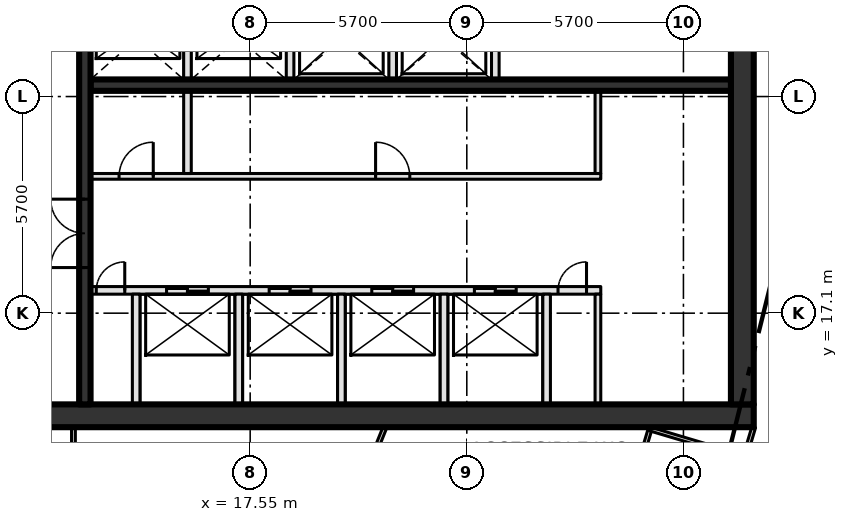
"""IFC4 building model, lengths in metres.
Left out: names, types, materials, properties, quantities, classifications, styles, units other than length and angle.
Written with IfcOpenShell. Run it as: python <this file> out.ifc"""

import sys

from ifc_helpers import new_model, si_unit, direction, frame, frame_2d, origin, place, context, subcontext, project, spatial, rectangle, extrude, element, fill, save


model = new_model("IFC4")
c1 = context("Model", 3, precision=1e-05, world=origin(), true_north=direction((0.0, 1.0)))
c2 = subcontext(c1, "Body", "Model", "MODEL_VIEW")
j1 = project(units=[si_unit("LENGTHUNIT", "METRE"), si_unit("PLANEANGLEUNIT", "RADIAN")], contexts=[c1])
p1 = place(None, origin())
s1 = spatial("IfcSite", under=j1, at=p1, CompositionType="ELEMENT")
p2 = place(p1, origin())
s2 = spatial("IfcBuilding", under=s1, at=p2, CompositionType="ELEMENT")
p3 = place(p2, frame((0.0, 0.0, 302.4)))
s3 = spatial("IfcBuildingStorey", under=s2, at=p3, CompositionType="ELEMENT", Elevation=302.4)
p4 = place(p3, frame((8.0, 14.4, -0.3), z_axis=(0.0, 0.0, 1.0), x_axis=(1.0, 0.0, 0.0)))
e1 = element("IfcWall", 1, at=p4, inside=s3, PredefinedType="SHEAR", context=c2, shape_type="SweptSolid", body=[
    extrude(rectangle(XDim=22.8, YDim=0.6, at=frame_2d((11.4, 0.0))), origin(), (0.0, 0.0, 1.0), 4.2),
])
p5 = place(p4, frame((2.3, 0.0, 0.3)))
e2 = element("IfcOpeningElement", 2, at=p5, cuts=e1, PredefinedType="OPENING", context=c2, shape_type="SweptSolid", body=[
    extrude(rectangle(XDim=1.8, YDim=2.1, at=frame_2d((0.9, 1.05))), frame((0.0, 0.31, 0.0), z_axis=(0.0, -1.0, 0.0), x_axis=(1.0, 0.0, 0.0)), (0.0, 0.0, 1.0), 0.62),
])
p6 = place(p3, frame((30.5, 14.7, -0.3), z_axis=(0.0, 0.0, 1.0), x_axis=(0.0, 1.0, 0.0)))
e3 = element("IfcWall", 3, at=p6, inside=s3, PredefinedType="SHEAR", context=c2, shape_type="SweptSolid", body=[
    extrude(rectangle(XDim=21.0, YDim=0.6, at=frame_2d((10.5, 0.0))), origin(), (0.0, 0.0, 1.0), 4.2),
])
p7 = place(p3, frame((13.35, 17.7, 0.0), z_axis=(0.0, 0.0, 1.0), x_axis=(1.0, 0.0, 0.0)))
e4 = element("IfcWall", 4, at=p7, inside=s3, PredefinedType="SOLIDWALL", context=c2, shape_type="SweptSolid", body=[
    extrude(rectangle(XDim=13.425, YDim=0.2, at=frame_2d((6.712, 0.0))), origin(), (0.0, 0.0, 1.0), 3.9),
])
p8 = place(p7, frame((2.0, 0.0, 0.0)))
e5 = element("IfcOpeningElement", 5, at=p8, cuts=e4, PredefinedType="OPENING", context=c2, shape_type="SweptSolid", body=[
    extrude(rectangle(XDim=1.1, YDim=2.1, at=frame_2d((0.55, 1.05))), frame((0.0, 0.11, 0.0), z_axis=(0.0, -1.0, 0.0), x_axis=(1.0, 0.0, 0.0)), (0.0, 0.0, 1.0), 0.22),
])
p9 = place(p7, frame((4.7, 0.0, 0.0)))
e6 = element("IfcOpeningElement", 6, at=p9, cuts=e4, PredefinedType="OPENING", context=c2, shape_type="SweptSolid", body=[
    extrude(rectangle(XDim=1.1, YDim=2.1, at=frame_2d((0.55, 1.05))), frame((0.0, 0.11, 0.0), z_axis=(0.0, -1.0, 0.0), x_axis=(1.0, 0.0, 0.0)), (0.0, 0.0, 1.0), 0.22),
])
p10 = place(p7, frame((7.4, 0.0, 0.0)))
e7 = element("IfcOpeningElement", 7, at=p10, cuts=e4, PredefinedType="OPENING", context=c2, shape_type="SweptSolid", body=[
    extrude(rectangle(XDim=1.1, YDim=2.1, at=frame_2d((0.55, 1.05))), frame((0.0, 0.11, 0.0), z_axis=(0.0, -1.0, 0.0), x_axis=(1.0, 0.0, 0.0)), (0.0, 0.0, 1.0), 0.22),
])
p11 = place(p7, frame((10.1, 0.0, 0.0)))
e8 = element("IfcOpeningElement", 8, at=p11, cuts=e4, PredefinedType="OPENING", context=c2, shape_type="SweptSolid", body=[
    extrude(rectangle(XDim=1.1, YDim=2.1, at=frame_2d((0.55, 1.05))), frame((0.0, 0.11, 0.0), z_axis=(0.0, -1.0, 0.0), x_axis=(1.0, 0.0, 0.0)), (0.0, 0.0, 1.0), 0.22),
])
p12 = place(p7, frame((0.15, 0.0, 0.0)))
e9 = element("IfcOpeningElement", 9, at=p12, cuts=e4, PredefinedType="OPENING", context=c2, shape_type="SweptSolid", body=[
    extrude(rectangle(XDim=0.75, YDim=2.1, at=frame_2d((0.375, 1.05))), frame((0.0, 0.11, 0.0), z_axis=(0.0, -1.0, 0.0), x_axis=(1.0, 0.0, 0.0)), (0.0, 0.0, 1.0), 0.22),
])
p13 = place(p7, frame((12.3, 0.0, 0.0)))
e10 = element("IfcOpeningElement", 10, at=p13, cuts=e4, PredefinedType="OPENING", context=c2, shape_type="SweptSolid", body=[
    extrude(rectangle(XDim=0.75, YDim=2.1, at=frame_2d((0.375, 1.05))), frame((0.0, 0.11, 0.0), z_axis=(0.0, -1.0, 0.0), x_axis=(1.0, 0.0, 0.0)), (0.0, 0.0, 1.0), 0.22),
])
p14 = place(p3, frame((13.35, 20.7, 0.0), z_axis=(0.0, 0.0, 1.0), x_axis=(1.0, 0.0, 0.0)))
e11 = element("IfcWall", 11, at=p14, inside=s3, PredefinedType="PARTITIONING", context=c2, shape_type="SweptSolid", body=[
    extrude(rectangle(XDim=13.425, YDim=0.15, at=frame_2d((6.712, 0.0))), origin(), (0.0, 0.0, 1.0), 3.9),
])
p15 = place(p14, frame((0.75, 0.0, 0.0)))
e12 = element("IfcOpeningElement", 12, at=p15, cuts=e11, PredefinedType="OPENING", context=c2, shape_type="SweptSolid", body=[
    extrude(rectangle(XDim=0.9, YDim=2.1, at=frame_2d((0.45, 1.05))), frame((0.0, 0.085, 0.0), z_axis=(0.0, -1.0, 0.0), x_axis=(1.0, 0.0, 0.0)), (0.0, 0.0, 1.0), 0.17),
])
p16 = place(p14, frame((7.5, 0.0, 0.0)))
e13 = element("IfcOpeningElement", 13, at=p16, cuts=e11, PredefinedType="OPENING", context=c2, shape_type="SweptSolid", body=[
    extrude(rectangle(XDim=0.9, YDim=2.1, at=frame_2d((0.45, 1.05))), frame((0.0, 0.085, 0.0), z_axis=(0.0, -1.0, 0.0), x_axis=(1.0, 0.0, 0.0)), (0.0, 0.0, 1.0), 0.17),
])
p17 = place(p3, frame((13.35, 23.1, 0.0), z_axis=(0.0, 0.0, 1.0), x_axis=(1.0, 0.0, 0.0)))
e14 = element("IfcWall", 14, at=p17, inside=s3, PredefinedType="SHEAR", context=c2, shape_type="SweptSolid", body=[
    extrude(rectangle(XDim=16.85, YDim=0.3, at=frame_2d((8.425, 0.0))), origin(), (0.0, 0.0, 1.0), 3.9),
])
p18 = place(p3, frame((13.2, 14.7, 0.0), z_axis=(0.0, 0.0, 1.0), x_axis=(0.0, 1.0, 0.0)))
e15 = element("IfcWall", 15, at=p18, inside=s3, PredefinedType="SHEAR", context=c2, shape_type="SweptSolid", body=[
    extrude(rectangle(XDim=21.0, YDim=0.3, at=frame_2d((10.5, 0.0))), origin(), (0.0, 0.0, 1.0), 3.9),
])
p19 = place(p18, frame((3.6, 0.0, 0.0)))
e16 = element("IfcOpeningElement", 16, at=p19, cuts=e15, PredefinedType="OPENING", context=c2, shape_type="SweptSolid", body=[
    extrude(rectangle(XDim=1.8, YDim=2.1, at=frame_2d((0.9, 1.05))), frame((0.0, 0.16, 0.0), z_axis=(0.0, -1.0, 0.0), x_axis=(1.0, 0.0, 0.0)), (0.0, 0.0, 1.0), 0.32),
])
p20 = place(p18, frame((11.7, 0.0, 0.0)))
e17 = element("IfcOpeningElement", 17, at=p20, cuts=e15, PredefinedType="OPENING", context=c2, shape_type="SweptSolid", body=[
    extrude(rectangle(XDim=1.2, YDim=2.1, at=frame_2d((0.6, 1.05))), frame((0.0, 0.16, 0.0), z_axis=(0.0, -1.0, 0.0), x_axis=(1.0, 0.0, 0.0)), (0.0, 0.0, 1.0), 0.32),
])
p21 = place(p3, frame((14.55, 14.7, 0.0), z_axis=(0.0, 0.0, 1.0), x_axis=(0.0, 1.0, 0.0)))
e18 = element("IfcWall", 18, at=p21, inside=s3, PredefinedType="SOLIDWALL", context=c2, shape_type="SweptSolid", body=[
    extrude(rectangle(XDim=2.9, YDim=0.2, at=frame_2d((1.45, 0.0))), origin(), (0.0, 0.0, 1.0), 3.9),
])
p22 = place(p3, frame((15.9, 20.775, 0.0), z_axis=(0.0, 0.0, 1.0), x_axis=(0.0, 1.0, 0.0)))
e19 = element("IfcWall", 19, at=p22, inside=s3, PredefinedType="SOLIDWALL", context=c2, shape_type="SweptSolid", body=[
    extrude(rectangle(XDim=4.625, YDim=0.2, at=frame_2d((2.312, 0.0))), origin(), (0.0, 0.0, 1.0), 3.9),
])
p23 = place(p3, frame((17.25, 14.7, 0.0), z_axis=(0.0, 0.0, 1.0), x_axis=(0.0, 1.0, 0.0)))
e20 = element("IfcWall", 20, at=p23, inside=s3, PredefinedType="SOLIDWALL", context=c2, shape_type="SweptSolid", body=[
    extrude(rectangle(XDim=2.9, YDim=0.2, at=frame_2d((1.45, 0.0))), origin(), (0.0, 0.0, 1.0), 3.9),
])
p24 = place(p3, frame((18.6, 23.25, 0.0), z_axis=(0.0, 0.0, 1.0), x_axis=(0.0, 1.0, 0.0)))
e21 = element("IfcWall", 21, at=p24, inside=s3, PredefinedType="SOLIDWALL", context=c2, shape_type="SweptSolid", body=[
    extrude(rectangle(XDim=5.15, YDim=0.2, at=frame_2d((2.575, 0.0))), origin(), (0.0, 0.0, 1.0), 3.9),
])
p25 = place(p24, frame((3.15, 0.0, 0.0)))
e22 = element("IfcOpeningElement", 22, at=p25, cuts=e21, PredefinedType="OPENING", context=c2, shape_type="SweptSolid", body=[
    extrude(rectangle(XDim=1.2, YDim=2.1, at=frame_2d((0.6, 1.05))), frame((0.0, 0.11, 0.0), z_axis=(0.0, -1.0, 0.0), x_axis=(1.0, 0.0, 0.0)), (0.0, 0.0, 1.0), 0.22),
])
p26 = place(p3, frame((19.95, 14.7, 0.0), z_axis=(0.0, 0.0, 1.0), x_axis=(0.0, 1.0, 0.0)))
e23 = element("IfcWall", 23, at=p26, inside=s3, PredefinedType="SOLIDWALL", context=c2, shape_type="SweptSolid", body=[
    extrude(rectangle(XDim=2.9, YDim=0.2, at=frame_2d((1.45, 0.0))), origin(), (0.0, 0.0, 1.0), 3.9),
])
p27 = place(p3, frame((21.3, 23.25, 0.0), z_axis=(0.0, 0.0, 1.0), x_axis=(0.0, 1.0, 0.0)))
e24 = element("IfcWall", 24, at=p27, inside=s3, PredefinedType="SOLIDWALL", context=c2, shape_type="SweptSolid", body=[
    extrude(rectangle(XDim=2.15, YDim=0.2, at=frame_2d((1.075, 0.0))), origin(), (0.0, 0.0, 1.0), 3.9),
])
p28 = place(p3, frame((22.65, 14.7, 0.0), z_axis=(0.0, 0.0, 1.0), x_axis=(0.0, 1.0, 0.0)))
e25 = element("IfcWall", 25, at=p28, inside=s3, PredefinedType="SOLIDWALL", context=c2, shape_type="SweptSolid", body=[
    extrude(rectangle(XDim=2.9, YDim=0.2, at=frame_2d((1.45, 0.0))), origin(), (0.0, 0.0, 1.0), 3.9),
])
p29 = place(p3, frame((24.0, 23.25, 0.0), z_axis=(0.0, 0.0, 1.0), x_axis=(0.0, 1.0, 0.0)))
e26 = element("IfcWall", 26, at=p29, inside=s3, PredefinedType="SOLIDWALL", context=c2, shape_type="SweptSolid", body=[
    extrude(rectangle(XDim=2.15, YDim=0.2, at=frame_2d((1.075, 0.0))), origin(), (0.0, 0.0, 1.0), 3.9),
])
p30 = place(p3, frame((25.35, 14.7, 0.0), z_axis=(0.0, 0.0, 1.0), x_axis=(0.0, 1.0, 0.0)))
e27 = element("IfcWall", 27, at=p30, inside=s3, PredefinedType="SOLIDWALL", context=c2, shape_type="SweptSolid", body=[
    extrude(rectangle(XDim=2.9, YDim=0.2, at=frame_2d((1.45, 0.0))), origin(), (0.0, 0.0, 1.0), 3.9),
])
p31 = place(p3, frame((26.7, 14.7, 0.0), z_axis=(0.0, 0.0, 1.0), x_axis=(0.0, 1.0, 0.0)))
e28 = element("IfcWall", 28, at=p31, inside=s3, PredefinedType="PARTITIONING", context=c2, shape_type="SweptSolid", body=[
    extrude(rectangle(XDim=2.9, YDim=0.15, at=frame_2d((1.45, 0.0))), origin(), (0.0, 0.0, 1.0), 3.9),
])
p32 = place(p3, frame((26.7, 20.775, 0.0), z_axis=(0.0, 0.0, 1.0), x_axis=(0.0, 1.0, 0.0)))
e29 = element("IfcWall", 29, at=p32, inside=s3, PredefinedType="PARTITIONING", context=c2, shape_type="SweptSolid", body=[
    extrude(rectangle(XDim=2.175, YDim=0.15, at=frame_2d((1.087, 0.0))), origin(), (0.0, 0.0, 1.0), 3.9),
])
p33 = place(p3, frame((12.9, 10.078, 0.0), z_axis=(0.0, 0.0, 1.0), x_axis=(0.0, 1.0, 0.0)))
e30 = element("IfcWall", 30, at=p33, inside=s3, PredefinedType="PARTITIONING", context=c2, shape_type="SweptSolid", body=[
    extrude(rectangle(XDim=4.022, YDim=0.1, at=frame_2d((2.011, 0.0))), origin(), (0.0, 0.0, 1.0), 3.9),
])
p34 = place(p3, frame((28.291, 5.69, 0.0), z_axis=(0.0, 0.0, 1.0), x_axis=(0.28588265334, 0.958264633867, 0.0)))
e31 = element("IfcWall", 31, at=p34, inside=s3, PredefinedType="PARTITIONING", context=c2, shape_type="SweptSolid", body=[
    extrude(rectangle(XDim=8.776, YDim=0.1, at=frame_2d((4.388, 0.0))), origin(), (0.0, 0.0, 1.0), 3.9),
])
p35 = place(p34, frame((6.23, 0.0, 0.0)))
e32 = element("IfcOpeningElement", 32, at=p35, cuts=e31, PredefinedType="OPENING", context=c2, shape_type="SweptSolid", body=[
    extrude(rectangle(XDim=1.0, YDim=2.1, at=frame_2d((0.5, 1.05))), frame((0.0, 0.06, 0.0), z_axis=(0.0, -1.0, 0.0), x_axis=(1.0, 0.0, 0.0)), (0.0, 0.0, 1.0), 0.12),
])
p36 = place(p3, frame((18.691, 8.142, 0.0), z_axis=(0.0, 0.0, 1.0), x_axis=(0.374447972071, 0.927247925968, 0.0)))
e33 = element("IfcWall", 33, at=p36, inside=s3, PredefinedType="PARTITIONING", context=c2, shape_type="SweptSolid", body=[
    extrude(rectangle(XDim=6.426, YDim=0.1, at=frame_2d((3.213, 0.0))), origin(), (0.0, 0.0, 1.0), 3.9),
])
p37 = place(p3, frame((27.386, 11.752, 0.0), z_axis=(0.0, 0.0, 1.0), x_axis=(0.285826425332, 0.958281406781, 0.0)))
e34 = element("IfcWall", 34, at=p37, inside=s3, PredefinedType="PARTITIONING", context=c2, shape_type="SweptSolid", body=[
    extrude(rectangle(XDim=2.4, YDim=0.1, at=frame_2d((1.2, 0.0))), origin(), (0.0, 0.0, 1.0), 3.9),
])
p38 = place(p3, frame((28.072, 14.052, 0.0), z_axis=(0.0, 0.0, 1.0), x_axis=(0.95828086131, -0.285828254108, 0.0)))
e35 = element("IfcWall", 35, at=p38, inside=s3, PredefinedType="PARTITIONING", context=c2, shape_type="SweptSolid", body=[
    extrude(rectangle(XDim=2.551, YDim=0.1, at=frame_2d((1.275, 0.0))), origin(), (0.0, 0.0, 1.0), 3.9),
])
p39 = place(p8, origin())
e36 = element("IfcDoor", 36, at=p39, inside=s3, OperationType="SLIDING_TO_LEFT", PredefinedType="DOOR", context=c2, shape_type="SweptSolid", body=[
    extrude(rectangle(XDim=1.1, YDim=2.1, at=frame_2d((0.55, 1.05))), frame((0.0, 0.025, 0.0), z_axis=(0.0, -1.0, 0.0), x_axis=(1.0, 0.0, 0.0)), (0.0, 0.0, 1.0), 0.05),
])
fill(e5, e36)
p40 = place(p9, origin())
e37 = element("IfcDoor", 37, at=p40, inside=s3, OperationType="SLIDING_TO_LEFT", PredefinedType="DOOR", context=c2, shape_type="SweptSolid", body=[
    extrude(rectangle(XDim=1.1, YDim=2.1, at=frame_2d((0.55, 1.05))), frame((0.0, 0.025, 0.0), z_axis=(0.0, -1.0, 0.0), x_axis=(1.0, 0.0, 0.0)), (0.0, 0.0, 1.0), 0.05),
])
fill(e6, e37)
p41 = place(p10, origin())
e38 = element("IfcDoor", 38, at=p41, inside=s3, OperationType="SLIDING_TO_LEFT", PredefinedType="DOOR", context=c2, shape_type="SweptSolid", body=[
    extrude(rectangle(XDim=1.1, YDim=2.1, at=frame_2d((0.55, 1.05))), frame((0.0, 0.025, 0.0), z_axis=(0.0, -1.0, 0.0), x_axis=(1.0, 0.0, 0.0)), (0.0, 0.0, 1.0), 0.05),
])
fill(e7, e38)
p42 = place(p11, origin())
e39 = element("IfcDoor", 39, at=p42, inside=s3, OperationType="SLIDING_TO_LEFT", PredefinedType="DOOR", context=c2, shape_type="SweptSolid", body=[
    extrude(rectangle(XDim=1.1, YDim=2.1, at=frame_2d((0.55, 1.05))), frame((0.0, 0.025, 0.0), z_axis=(0.0, -1.0, 0.0), x_axis=(1.0, 0.0, 0.0)), (0.0, 0.0, 1.0), 0.05),
])
fill(e8, e39)
p43 = place(p12, origin())
e40 = element("IfcDoor", 40, at=p43, inside=s3, OperationType="SINGLE_SWING_RIGHT", PredefinedType="DOOR", context=c2, shape_type="SweptSolid", body=[
    extrude(rectangle(XDim=0.75, YDim=2.1, at=frame_2d((0.375, 1.05))), frame((0.0, 0.025, 0.0), z_axis=(0.0, -1.0, 0.0), x_axis=(1.0, 0.0, 0.0)), (0.0, 0.0, 1.0), 0.05),
])
fill(e9, e40)
p44 = place(p13, origin())
e41 = element("IfcDoor", 41, at=p44, inside=s3, OperationType="SINGLE_SWING_RIGHT", PredefinedType="DOOR", context=c2, shape_type="SweptSolid", body=[
    extrude(rectangle(XDim=0.75, YDim=2.1, at=frame_2d((0.375, 1.05))), frame((0.0, 0.025, 0.0), z_axis=(0.0, -1.0, 0.0), x_axis=(1.0, 0.0, 0.0)), (0.0, 0.0, 1.0), 0.05),
])
fill(e10, e41)
p45 = place(p15, origin())
e42 = element("IfcDoor", 42, at=p45, inside=s3, OperationType="SINGLE_SWING_RIGHT", PredefinedType="DOOR", context=c2, shape_type="SweptSolid", body=[
    extrude(rectangle(XDim=0.9, YDim=2.1, at=frame_2d((0.45, 1.05))), frame((0.0, 0.025, 0.0), z_axis=(0.0, -1.0, 0.0), x_axis=(1.0, 0.0, 0.0)), (0.0, 0.0, 1.0), 0.05),
])
fill(e12, e42)
p46 = place(p16, origin())
e43 = element("IfcDoor", 43, at=p46, inside=s3, OperationType="SINGLE_SWING_LEFT", PredefinedType="DOOR", context=c2, shape_type="SweptSolid", body=[
    extrude(rectangle(XDim=0.9, YDim=2.1, at=frame_2d((0.45, 1.05))), frame((0.0, 0.025, 0.0), z_axis=(0.0, -1.0, 0.0), x_axis=(1.0, 0.0, 0.0)), (0.0, 0.0, 1.0), 0.05),
])
fill(e13, e43)
p47 = place(p19, origin())
e44 = element("IfcDoor", 44, at=p47, inside=s3, OperationType="DOUBLE_DOOR_SINGLE_SWING", PredefinedType="DOOR", context=c2, shape_type="SweptSolid", body=[
    extrude(rectangle(XDim=1.8, YDim=2.1, at=frame_2d((0.9, 1.05))), frame((0.0, 0.025, 0.0), z_axis=(0.0, -1.0, 0.0), x_axis=(1.0, 0.0, 0.0)), (0.0, 0.0, 1.0), 0.05),
])
fill(e16, e44)
save(model, sys.argv[1])
